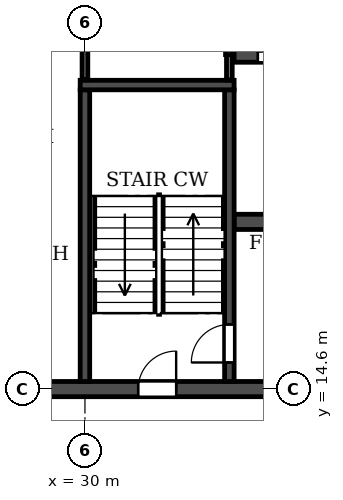
"""IFC4 building model, lengths in metres.
Left out: names, types, materials, properties, quantities, classifications, styles, units other than length and angle.
Written with IfcOpenShell. Run it as: python <this file> out.ifc"""

import sys

from ifc_helpers import new_model, si_unit, direction, frame, frame_2d, origin, place, context, subcontext, project, spatial, rectangle, extrude, element, fill, save


model = new_model("IFC4")
c1 = context("Model", 3, precision=1e-05, world=origin(), true_north=direction((0.0, 1.0)))
c2 = subcontext(c1, "Body", "Model", "MODEL_VIEW")
j1 = project(units=[si_unit("LENGTHUNIT", "METRE"), si_unit("PLANEANGLEUNIT", "RADIAN")], contexts=[c1])
p1 = place(None, origin())
s1 = spatial("IfcSite", under=j1, at=p1, CompositionType="ELEMENT")
p2 = place(p1, origin())
s2 = spatial("IfcBuilding", under=s1, at=p2, CompositionType="ELEMENT")
p3 = place(p2, frame((0.0, 0.0, 175.2)))
s3 = spatial("IfcBuildingStorey", under=s2, at=p3, CompositionType="ELEMENT", Elevation=175.2)
p4 = place(p3, frame((18.2, 14.6, 0.0), z_axis=(0.0, 0.0, 1.0), x_axis=(1.0, 0.0, 0.0)))
e1 = element("IfcWall", 1, at=p4, inside=s3, PredefinedType="SOLIDWALL", context=c2, shape_type="SweptSolid", body=[
    extrude(rectangle(XDim=65.6, YDim=0.4, at=frame_2d((32.8, 0.0))), origin(), (0.0, 0.0, 1.0), 3.08),
])
p5 = place(p4, frame((0.7, 0.0, 0.0)))
e2 = element("IfcOpeningElement", 2, at=p5, cuts=e1, PredefinedType="OPENING", context=c2, shape_type="SweptSolid", body=[
    extrude(rectangle(XDim=1.0, YDim=2.1, at=frame_2d((0.5, 1.05))), frame((0.0, 0.21, 0.0), z_axis=(0.0, -1.0, 0.0), x_axis=(1.0, 0.0, 0.0)), (0.0, 0.0, 1.0), 0.42),
])
p6 = place(p4, frame((8.6, 0.0, 0.0)))
e3 = element("IfcOpeningElement", 3, at=p6, cuts=e1, PredefinedType="OPENING", context=c2, shape_type="SweptSolid", body=[
    extrude(rectangle(XDim=1.0, YDim=2.1, at=frame_2d((0.5, 1.05))), frame((0.0, 0.21, 0.0), z_axis=(0.0, -1.0, 0.0), x_axis=(1.0, 0.0, 0.0)), (0.0, 0.0, 1.0), 0.42),
])
p7 = place(p4, frame((13.2, 0.0, 0.0)))
e4 = element("IfcOpeningElement", 4, at=p7, cuts=e1, PredefinedType="OPENING", context=c2, shape_type="SweptSolid", body=[
    extrude(rectangle(XDim=1.0, YDim=2.1, at=frame_2d((0.5, 1.05))), frame((0.0, 0.21, 0.0), z_axis=(0.0, -1.0, 0.0), x_axis=(1.0, 0.0, 0.0)), (0.0, 0.0, 1.0), 0.42),
])
p8 = place(p4, frame((25.8, 0.0, 0.0)))
e5 = element("IfcOpeningElement", 5, at=p8, cuts=e1, PredefinedType="OPENING", context=c2, shape_type="SweptSolid", body=[
    extrude(rectangle(XDim=1.0, YDim=2.1, at=frame_2d((0.5, 1.05))), frame((0.0, 0.21, 0.0), z_axis=(0.0, -1.0, 0.0), x_axis=(1.0, 0.0, 0.0)), (0.0, 0.0, 1.0), 0.42),
])
p9 = place(p4, frame((29.7, 0.0, 0.0)))
e6 = element("IfcOpeningElement", 6, at=p9, cuts=e1, PredefinedType="OPENING", context=c2, shape_type="SweptSolid", body=[
    extrude(rectangle(XDim=1.0, YDim=2.1, at=frame_2d((0.5, 1.05))), frame((0.0, 0.21, 0.0), z_axis=(0.0, -1.0, 0.0), x_axis=(1.0, 0.0, 0.0)), (0.0, 0.0, 1.0), 0.42),
])
p10 = place(p4, frame((32.3, 0.0, 0.0)))
e7 = element("IfcOpeningElement", 7, at=p10, cuts=e1, PredefinedType="OPENING", context=c2, shape_type="SweptSolid", body=[
    extrude(rectangle(XDim=1.0, YDim=2.1, at=frame_2d((0.5, 1.05))), frame((0.0, 0.21, 0.0), z_axis=(0.0, -1.0, 0.0), x_axis=(1.0, 0.0, 0.0)), (0.0, 0.0, 1.0), 0.42),
])
p11 = place(p4, frame((37.5, 0.0, 0.0)))
e8 = element("IfcOpeningElement", 8, at=p11, cuts=e1, PredefinedType="OPENING", context=c2, shape_type="SweptSolid", body=[
    extrude(rectangle(XDim=1.0, YDim=2.1, at=frame_2d((0.5, 1.05))), frame((0.0, 0.21, 0.0), z_axis=(0.0, -1.0, 0.0), x_axis=(1.0, 0.0, 0.0)), (0.0, 0.0, 1.0), 0.42),
])
p12 = place(p4, frame((51.4, 0.0, 0.0)))
e9 = element("IfcOpeningElement", 9, at=p12, cuts=e1, PredefinedType="OPENING", context=c2, shape_type="SweptSolid", body=[
    extrude(rectangle(XDim=1.0, YDim=2.1, at=frame_2d((0.5, 1.05))), frame((0.0, 0.21, 0.0), z_axis=(0.0, -1.0, 0.0), x_axis=(1.0, 0.0, 0.0)), (0.0, 0.0, 1.0), 0.42),
])
p13 = place(p4, frame((56.0, 0.0, 0.0)))
e10 = element("IfcOpeningElement", 10, at=p13, cuts=e1, PredefinedType="OPENING", context=c2, shape_type="SweptSolid", body=[
    extrude(rectangle(XDim=1.0, YDim=2.1, at=frame_2d((0.5, 1.05))), frame((0.0, 0.21, 0.0), z_axis=(0.0, -1.0, 0.0), x_axis=(1.0, 0.0, 0.0)), (0.0, 0.0, 1.0), 0.42),
])
p14 = place(p4, frame((63.9, 0.0, 0.0)))
e11 = element("IfcOpeningElement", 11, at=p14, cuts=e1, PredefinedType="OPENING", context=c2, shape_type="SweptSolid", body=[
    extrude(rectangle(XDim=1.0, YDim=2.1, at=frame_2d((0.5, 1.05))), frame((0.0, 0.21, 0.0), z_axis=(0.0, -1.0, 0.0), x_axis=(1.0, 0.0, 0.0)), (0.0, 0.0, 1.0), 0.42),
])
p15 = place(p3, frame((33.925, 19.0, 0.0), z_axis=(0.0, 0.0, 1.0), x_axis=(1.0, 0.0, 0.0)))
e12 = element("IfcWall", 12, at=p15, inside=s3, PredefinedType="SOLIDWALL", context=c2, shape_type="SweptSolid", body=[
    extrude(rectangle(XDim=34.15, YDim=0.4, at=frame_2d((17.075, 0.0))), origin(), (0.0, 0.0, 1.0), 3.08),
])
p16 = place(p15, frame((16.175, 0.0, 0.0)))
e13 = element("IfcOpeningElement", 13, at=p16, cuts=e12, PredefinedType="OPENING", context=c2, shape_type="SweptSolid", body=[
    extrude(rectangle(XDim=1.8, YDim=2.1, at=frame_2d((0.9, 1.05))), frame((0.0, 0.21, 0.0), z_axis=(0.0, -1.0, 0.0), x_axis=(1.0, 0.0, 0.0)), (0.0, 0.0, 1.0), 0.42),
])
p17 = place(p15, frame((1.525, 0.0, 0.0)))
e14 = element("IfcOpeningElement", 14, at=p17, cuts=e12, PredefinedType="OPENING", context=c2, shape_type="SweptSolid", body=[
    extrude(rectangle(XDim=1.8, YDim=2.1, at=frame_2d((0.9, 1.05))), frame((0.0, 0.21, 0.0), z_axis=(0.0, -1.0, 0.0), x_axis=(1.0, 0.0, 0.0)), (0.0, 0.0, 1.0), 0.42),
])
p18 = place(p15, frame((30.825, 0.0, 0.0)))
e15 = element("IfcOpeningElement", 15, at=p18, cuts=e12, PredefinedType="OPENING", context=c2, shape_type="SweptSolid", body=[
    extrude(rectangle(XDim=1.8, YDim=2.1, at=frame_2d((0.9, 1.05))), frame((0.0, 0.21, 0.0), z_axis=(0.0, -1.0, 0.0), x_axis=(1.0, 0.0, 0.0)), (0.0, 0.0, 1.0), 0.42),
])
p19 = place(p3, frame((33.925, 23.4, 0.0), z_axis=(0.0, 0.0, 1.0), x_axis=(1.0, 0.0, 0.0)))
e16 = element("IfcWall", 16, at=p19, inside=s3, PredefinedType="SOLIDWALL", context=c2, shape_type="SweptSolid", body=[
    extrude(rectangle(XDim=34.15, YDim=0.4, at=frame_2d((17.075, 0.0))), origin(), (0.0, 0.0, 1.0), 3.08),
])
p20 = place(p19, frame((16.175, 0.0, 0.0)))
e17 = element("IfcOpeningElement", 17, at=p20, cuts=e16, PredefinedType="OPENING", context=c2, shape_type="SweptSolid", body=[
    extrude(rectangle(XDim=1.8, YDim=2.1, at=frame_2d((0.9, 1.05))), frame((0.0, 0.21, 0.0), z_axis=(0.0, -1.0, 0.0), x_axis=(1.0, 0.0, 0.0)), (0.0, 0.0, 1.0), 0.42),
])
p21 = place(p19, frame((0.625, 0.0, 0.0)))
e18 = element("IfcOpeningElement", 18, at=p21, cuts=e16, PredefinedType="OPENING", context=c2, shape_type="SweptSolid", body=[
    extrude(rectangle(XDim=1.1, YDim=2.1, at=frame_2d((0.55, 1.05))), frame((0.0, 0.21, 0.0), z_axis=(0.0, -1.0, 0.0), x_axis=(1.0, 0.0, 0.0)), (0.0, 0.0, 1.0), 0.42),
])
p22 = place(p19, frame((3.225, 0.0, 0.0)))
e19 = element("IfcOpeningElement", 19, at=p22, cuts=e16, PredefinedType="OPENING", context=c2, shape_type="SweptSolid", body=[
    extrude(rectangle(XDim=1.1, YDim=2.1, at=frame_2d((0.55, 1.05))), frame((0.0, 0.21, 0.0), z_axis=(0.0, -1.0, 0.0), x_axis=(1.0, 0.0, 0.0)), (0.0, 0.0, 1.0), 0.42),
])
p23 = place(p19, frame((5.825, 0.0, 0.0)))
e20 = element("IfcOpeningElement", 20, at=p23, cuts=e16, PredefinedType="OPENING", context=c2, shape_type="SweptSolid", body=[
    extrude(rectangle(XDim=1.1, YDim=2.1, at=frame_2d((0.55, 1.05))), frame((0.0, 0.21, 0.0), z_axis=(0.0, -1.0, 0.0), x_axis=(1.0, 0.0, 0.0)), (0.0, 0.0, 1.0), 0.42),
])
p24 = place(p19, frame((8.425, 0.0, 0.0)))
e21 = element("IfcOpeningElement", 21, at=p24, cuts=e16, PredefinedType="OPENING", context=c2, shape_type="SweptSolid", body=[
    extrude(rectangle(XDim=1.1, YDim=2.1, at=frame_2d((0.55, 1.05))), frame((0.0, 0.21, 0.0), z_axis=(0.0, -1.0, 0.0), x_axis=(1.0, 0.0, 0.0)), (0.0, 0.0, 1.0), 0.42),
])
p25 = place(p19, frame((11.025, 0.0, 0.0)))
e22 = element("IfcOpeningElement", 22, at=p25, cuts=e16, PredefinedType="OPENING", context=c2, shape_type="SweptSolid", body=[
    extrude(rectangle(XDim=1.1, YDim=2.1, at=frame_2d((0.55, 1.05))), frame((0.0, 0.21, 0.0), z_axis=(0.0, -1.0, 0.0), x_axis=(1.0, 0.0, 0.0)), (0.0, 0.0, 1.0), 0.42),
])
p26 = place(p19, frame((13.625, 0.0, 0.0)))
e23 = element("IfcOpeningElement", 23, at=p26, cuts=e16, PredefinedType="OPENING", context=c2, shape_type="SweptSolid", body=[
    extrude(rectangle(XDim=1.1, YDim=2.1, at=frame_2d((0.55, 1.05))), frame((0.0, 0.21, 0.0), z_axis=(0.0, -1.0, 0.0), x_axis=(1.0, 0.0, 0.0)), (0.0, 0.0, 1.0), 0.42),
])
p27 = place(p19, frame((27.225, 0.0, 0.0)))
e24 = element("IfcOpeningElement", 24, at=p27, cuts=e16, PredefinedType="OPENING", context=c2, shape_type="SweptSolid", body=[
    extrude(rectangle(XDim=1.1, YDim=2.1, at=frame_2d((0.55, 1.05))), frame((0.0, 0.21, 0.0), z_axis=(0.0, -1.0, 0.0), x_axis=(1.0, 0.0, 0.0)), (0.0, 0.0, 1.0), 0.42),
])
p28 = place(p3, frame((30.0, 14.8, 0.0), z_axis=(0.0, 0.0, 1.0), x_axis=(0.0, 1.0, 0.0)))
e25 = element("IfcWall", 25, at=p28, inside=s3, PredefinedType="SOLIDWALL", context=c2, shape_type="SweptSolid", body=[
    extrude(rectangle(XDim=7.675, YDim=0.25, at=frame_2d((3.837, 0.0))), origin(), (0.0, 0.0, 1.0), 3.08),
])
p29 = place(p3, frame((33.8, 14.8, 0.0), z_axis=(0.0, 0.0, 1.0), x_axis=(0.0, 1.0, 0.0)))
e26 = element("IfcWall", 26, at=p29, inside=s3, PredefinedType="SOLIDWALL", context=c2, shape_type="SweptSolid", body=[
    extrude(rectangle(XDim=7.675, YDim=0.25, at=frame_2d((3.837, 0.0))), origin(), (0.0, 0.0, 1.0), 3.08),
])
p30 = place(p29, frame((0.5, 0.0, 0.0)))
e27 = element("IfcOpeningElement", 27, at=p30, cuts=e26, PredefinedType="OPENING", context=c2, shape_type="SweptSolid", body=[
    extrude(rectangle(XDim=1.0, YDim=2.1, at=frame_2d((0.5, 1.05))), frame((0.0, 0.135, 0.0), z_axis=(0.0, -1.0, 0.0), x_axis=(1.0, 0.0, 0.0)), (0.0, 0.0, 1.0), 0.27),
])
p31 = place(p3, frame((29.875, 22.6, 0.0), z_axis=(0.0, 0.0, 1.0), x_axis=(1.0, 0.0, 0.0)))
e28 = element("IfcWall", 28, at=p31, inside=s3, PredefinedType="SOLIDWALL", context=c2, shape_type="SweptSolid", body=[
    extrude(rectangle(XDim=4.05, YDim=0.25, at=frame_2d((2.025, 0.0))), origin(), (0.0, 0.0, 1.0), 3.08),
])
p32 = place(p3, frame((30.0, 22.735, 0.0), z_axis=(0.0, 0.0, 1.0), x_axis=(0.0, 1.0, 0.0)))
e29 = element("IfcWall", 29, at=p32, inside=s3, PredefinedType="PARTITIONING", context=c2, shape_type="SweptSolid", body=[
    extrude(rectangle(XDim=4.855, YDim=0.15, at=frame_2d((2.427, 0.0))), origin(), (0.0, 0.0, 1.0), 3.08),
])
p33 = place(p3, frame((33.8, 22.735, 0.0), z_axis=(0.0, 0.0, 1.0), x_axis=(0.0, 1.0, 0.0)))
e30 = element("IfcWall", 30, at=p33, inside=s3, PredefinedType="PARTITIONING", context=c2, shape_type="SweptSolid", body=[
    extrude(rectangle(XDim=0.665, YDim=0.15, at=frame_2d((0.333, 0.0))), origin(), (0.0, 0.0, 1.0), 3.08),
])
p34 = place(p3, frame((33.8, 23.4, 0.0), z_axis=(0.0, 0.0, 1.0), x_axis=(0.0, 1.0, 0.0)))
e31 = element("IfcWall", 31, at=p34, inside=s3, PredefinedType="PARTITIONING", context=c2, shape_type="SweptSolid", body=[
    extrude(rectangle(XDim=2.7, YDim=0.2, at=frame_2d((1.35, 0.0))), origin(), (0.0, 0.0, 1.0), 3.08),
])
p35 = place(p7, origin())
e32 = element("IfcDoor", 32, at=p35, inside=s3, OperationType="SINGLE_SWING_RIGHT", PredefinedType="DOOR", context=c2, shape_type="SweptSolid", body=[
    extrude(rectangle(XDim=1.0, YDim=2.1, at=frame_2d((0.5, 1.05))), frame((0.0, 0.025, 0.0), z_axis=(0.0, -1.0, 0.0), x_axis=(1.0, 0.0, 0.0)), (0.0, 0.0, 1.0), 0.05),
])
fill(e4, e32)
p36 = place(p30, origin())
e33 = element("IfcDoor", 33, at=p36, inside=s3, OperationType="SINGLE_SWING_LEFT", PredefinedType="DOOR", context=c2, shape_type="SweptSolid", body=[
    extrude(rectangle(XDim=1.0, YDim=2.1, at=frame_2d((0.5, 1.05))), frame((0.0, 0.025, 0.0), z_axis=(0.0, -1.0, 0.0), x_axis=(1.0, 0.0, 0.0)), (0.0, 0.0, 1.0), 0.05),
])
fill(e27, e33)
p37 = place(p21, origin())
e34 = element("IfcDoor", 34, at=p37, inside=s3, OperationType="DOUBLE_DOOR_SLIDING", PredefinedType="DOOR", context=c2, shape_type="SweptSolid", body=[
    extrude(rectangle(XDim=1.1, YDim=2.1, at=frame_2d((0.55, 1.05))), frame((0.0, 0.025, 0.0), z_axis=(0.0, -1.0, 0.0), x_axis=(1.0, 0.0, 0.0)), (0.0, 0.0, 1.0), 0.05),
])
fill(e18, e34)
save(model, sys.argv[1])
